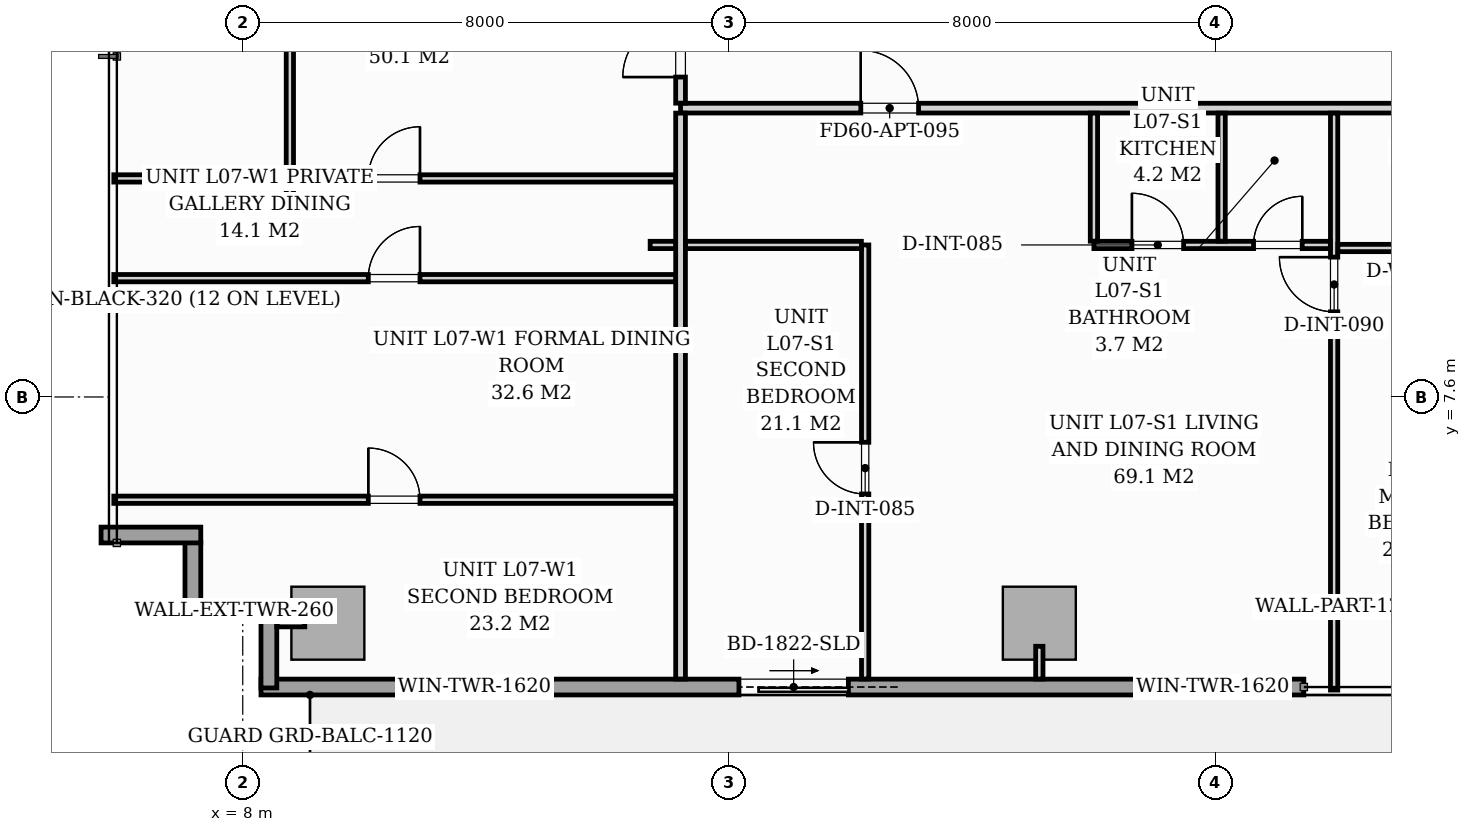
"""IFC4 building model, lengths in metres.
Left out: names, types, materials, properties, quantities, classifications, styles, units other than length and angle.
Written with IfcOpenShell. Run it as: python <this file> out.ifc"""

import sys

from ifc_helpers import new_model, si_unit, direction, frame, frame_2d, origin, origin_2d, place, context, subcontext, project, spatial, rectangle, extrude, source, transform, mapped, element, fill, save


model = new_model("IFC4")
c1 = context("Model", 3, precision=1e-05, world=origin(), true_north=direction((0.0, 1.0)))
c2 = subcontext(c1, "Body", "Model", "MODEL_VIEW")
j1 = project(units=[si_unit("LENGTHUNIT", "METRE"), si_unit("PLANEANGLEUNIT", "RADIAN")], contexts=[c1])
p1 = place(None, origin())
s1 = spatial("IfcSite", under=j1, at=p1, CompositionType="ELEMENT")
p2 = place(p1, origin())
s2 = spatial("IfcBuilding", under=s1, at=p2, CompositionType="ELEMENT")
p3 = place(p2, frame((0.0, 0.0, 29.4)))
s3 = spatial("IfcBuildingStorey", under=s2, at=p3, CompositionType="ELEMENT", Elevation=29.4)
m1 = source(origin(), c2, "Body", "SweptSolid", [
    extrude(rectangle(XDim=1.2, YDim=1.2, at=origin_2d()), origin(), (0.0, 0.0, 1.0), 3.196),
])
for number, where, z_axis, x_axis in (
    (1, (9.4, 3.88, 0.002), (0.0, 0.0, 1.0), (1.0, 0.0, 0.0)),
    (2, (21.1, 3.88, 0.002), (0.0, 0.0, 1.0), (1.0, 0.0, 0.0)),
):
    element("IfcColumn", number, at=place(p3, frame(where, z_axis=z_axis, x_axis=x_axis)), inside=s3, PredefinedType="COLUMN", context=c2, shape_type="MappedRepresentation", body=[
        mapped(m1, transform((0.0, 0.0, 0.0), scale=1.0)),
    ])
p4 = place(p3, frame((8.798, 4.08, 0.0), z_axis=(0.0, 0.0, 1.0), x_axis=(-1.0, 0.0, 0.0)))
e3 = element("IfcWall", 3, at=p4, inside=s3, PredefinedType="STANDARD", context=c2, shape_type="SweptSolid", body=[
    extrude(rectangle(XDim=1.878, YDim=0.26, at=frame_2d((0.939, 0.0))), origin(), (0.0, 0.0, 1.0), 2.94),
])
p5 = place(p3, frame((7.18, 4.065, 0.0), z_axis=(0.0, 0.0, 1.0), x_axis=(0.0, 1.0, 0.0)))
e4 = element("IfcWall", 4, at=p5, inside=s3, PredefinedType="STANDARD", context=c2, shape_type="SweptSolid", body=[
    extrude(rectangle(XDim=1.15, YDim=0.26, at=frame_2d((0.575, 0.0))), origin(), (0.0, 0.0, 1.0), 2.94),
])
p6 = place(p3, frame((7.31, 5.33, 0.0), z_axis=(0.0, 0.0, 1.0), x_axis=(-1.0, 0.0, 0.0)))
e5 = element("IfcWall", 5, at=p6, inside=s3, PredefinedType="STANDARD", context=c2, shape_type="SweptSolid", body=[
    extrude(rectangle(XDim=1.64, YDim=0.26, at=frame_2d((0.82, 0.0))), origin(), (0.0, 0.0, 1.0), 2.94),
])
p7 = place(p3, frame((25.45, 2.83, 0.0), z_axis=(0.0, 0.0, 1.0), x_axis=(-1.0, 0.0, 0.0)))
e6 = element("IfcWall", 6, at=p7, inside=s3, PredefinedType="STANDARD", context=c2, shape_type="SweptSolid", body=[
    extrude(rectangle(XDim=17.15, YDim=0.26, at=frame_2d((8.575, 0.0))), origin(), (0.0, 0.0, 1.0), 2.94),
])
p8 = place(p7, frame((7.49, 0.0, 0.0)))
e7 = element("IfcOpeningElement", 7, at=p8, cuts=e6, PredefinedType="OPENING", context=c2, shape_type="SweptSolid", body=[
    extrude(rectangle(XDim=1.8, YDim=2.06, at=frame_2d((0.9, 1.03))), frame((0.0, 0.14, 0.0), z_axis=(0.0, -1.0, 0.0), x_axis=(1.0, 0.0, 0.0)), (0.0, 0.0, 1.0), 0.28),
])
p9 = place(p7, frame((0.7, 0.0, 0.65)))
e8 = element("IfcOpeningElement", 8, at=p9, cuts=e6, PredefinedType="OPENING", context=c2, shape_type="SweptSolid", body=[
    extrude(rectangle(XDim=1.6, YDim=1.5, at=frame_2d((0.8, 0.75))), frame((0.0, 0.14, 0.0), z_axis=(0.0, -1.0, 0.0), x_axis=(1.0, 0.0, 0.0)), (0.0, 0.0, 1.0), 0.28),
])
p10 = place(p7, frame((12.84, 0.0, 0.75)))
e9 = element("IfcOpeningElement", 9, at=p10, cuts=e6, PredefinedType="OPENING", context=c2, shape_type="SweptSolid", body=[
    extrude(rectangle(XDim=1.6, YDim=1.5, at=frame_2d((0.8, 0.75))), frame((0.0, 0.14, 0.0), z_axis=(0.0, -1.0, 0.0), x_axis=(1.0, 0.0, 0.0)), (0.0, 0.0, 1.0), 0.28),
])
p11 = place(p3, frame((8.43, 2.815, 0.0), z_axis=(0.0, 0.0, 1.0), x_axis=(0.0, 1.0, 0.0)))
e10 = element("IfcWall", 10, at=p11, inside=s3, PredefinedType="STANDARD", context=c2, shape_type="SweptSolid", body=[
    extrude(rectangle(XDim=1.395, YDim=0.26, at=frame_2d((0.698, 0.0))), origin(), (0.0, 0.0, 1.0), 2.94),
])
p12 = place(p3, frame((15.2, 12.35, 0.0), z_axis=(0.0, 0.0, 1.0), x_axis=(1.0, 0.0, 0.0)))
e11 = element("IfcWall", 11, at=p12, inside=s3, PredefinedType="PARTITIONING", context=c2, shape_type="SweptSolid", body=[
    extrude(rectangle(XDim=37.1, YDim=0.16, at=frame_2d((18.55, 0.0))), origin(), (0.0, 0.0, 1.0), 2.94),
])
p13 = place(p12, frame((2.964, 0.0, 0.0)))
e12 = element("IfcOpeningElement", 12, at=p13, cuts=e11, PredefinedType="OPENING", context=c2, shape_type="SweptSolid", body=[
    extrude(rectangle(XDim=0.95, YDim=2.06, at=frame_2d((0.475, 1.03))), frame((0.0, 0.09, 0.0), z_axis=(0.0, -1.0, 0.0), x_axis=(1.0, 0.0, 0.0)), (0.0, 0.0, 1.0), 0.18),
])
p14 = place(p12, frame((28.202, 0.0, 0.0)))
e13 = element("IfcOpeningElement", 13, at=p14, cuts=e11, PredefinedType="OPENING", context=c2, shape_type="SweptSolid", body=[
    extrude(rectangle(XDim=0.95, YDim=2.06, at=frame_2d((0.475, 1.03))), frame((0.0, 0.09, 0.0), z_axis=(0.0, -1.0, 0.0), x_axis=(1.0, 0.0, 0.0)), (0.0, 0.0, 1.0), 0.18),
])
p15 = place(p3, frame((15.2, 2.962, 0.0), z_axis=(0.0, 0.0, 1.0), x_axis=(0.0, 1.0, 0.0)))
e14 = element("IfcWall", 14, at=p15, inside=s3, PredefinedType="PARTITIONING", context=c2, shape_type="SweptSolid", body=[
    extrude(rectangle(XDim=9.306, YDim=0.16, at=frame_2d((4.653, 0.0))), origin(), (0.0, 0.0, 1.0), 2.94),
])
p16 = place(p3, frame((15.2, 12.432, 0.0), z_axis=(0.0, 0.0, 1.0), x_axis=(0.0, 1.0, 0.0)))
e15 = element("IfcWall", 15, at=p16, inside=s3, PredefinedType="PARTITIONING", context=c2, shape_type="SweptSolid", body=[
    extrude(rectangle(XDim=15.006, YDim=0.16, at=frame_2d((7.503, 0.0))), origin(), (0.0, 0.0, 1.0), 2.94),
])
p17 = place(p16, frame((0.429, 0.0, 0.0)))
e16 = element("IfcOpeningElement", 16, at=p17, cuts=e15, PredefinedType="OPENING", context=c2, shape_type="SweptSolid", body=[
    extrude(rectangle(XDim=0.95, YDim=2.06, at=frame_2d((0.475, 1.03))), frame((0.0, 0.09, 0.0), z_axis=(0.0, -1.0, 0.0), x_axis=(1.0, 0.0, 0.0)), (0.0, 0.0, 1.0), 0.18),
])
p18 = place(p3, frame((25.948, 2.78, 0.0), z_axis=(0.0, 0.0, 1.0), x_axis=(0.0, 1.0, 0.0)))
e17 = element("IfcWall", 17, at=p18, inside=s3, PredefinedType="PARTITIONING", context=c2, shape_type="SweptSolid", body=[
    extrude(rectangle(XDim=9.488, YDim=0.12, at=frame_2d((4.744, 0.0))), origin(), (0.0, 0.0, 1.0), 2.94),
])
p19 = place(p18, frame((6.22, 0.0, 0.0)))
e18 = element("IfcOpeningElement", 18, at=p19, cuts=e17, PredefinedType="OPENING", context=c2, shape_type="SweptSolid", body=[
    extrude(rectangle(XDim=0.9, YDim=2.05, at=frame_2d((0.45, 1.025))), frame((0.0, 0.07, 0.0), z_axis=(0.0, -1.0, 0.0), x_axis=(1.0, 0.0, 0.0)), (0.0, 0.0, 1.0), 0.14),
])
p20 = place(p3, frame((21.998, 10.1, 0.0), z_axis=(0.0, 0.0, 1.0), x_axis=(1.0, 0.0, 0.0)))
e19 = element("IfcWall", 19, at=p20, inside=s3, PredefinedType="PARTITIONING", context=c2, shape_type="SweptSolid", body=[
    extrude(rectangle(XDim=3.888, YDim=0.12, at=frame_2d((1.944, 0.0))), origin(), (0.0, 0.0, 1.0), 2.94),
])
p21 = place(p20, frame((0.625, 0.0, 0.0)))
e20 = element("IfcOpeningElement", 20, at=p21, cuts=e19, PredefinedType="OPENING", context=c2, shape_type="SweptSolid", body=[
    extrude(rectangle(XDim=0.85, YDim=2.05, at=frame_2d((0.425, 1.025))), frame((0.0, 0.07, 0.0), z_axis=(0.0, -1.0, 0.0), x_axis=(1.0, 0.0, 0.0)), (0.0, 0.0, 1.0), 0.14),
])
p22 = place(p20, frame((2.625, 0.0, 0.0)))
e21 = element("IfcOpeningElement", 21, at=p22, cuts=e19, PredefinedType="OPENING", context=c2, shape_type="SweptSolid", body=[
    extrude(rectangle(XDim=0.8, YDim=2.02, at=frame_2d((0.4, 1.01))), frame((0.0, 0.07, 0.0), z_axis=(0.0, -1.0, 0.0), x_axis=(1.0, 0.0, 0.0)), (0.0, 0.0, 1.0), 0.14),
])
for number, where, z_axis, x_axis in (
    (22, (24.098, 10.162, 0.0), (0.0, 0.0, 1.0), (0.0, 1.0, 0.0)),
    (23, (21.998, 10.162, 0.0), (0.0, 0.0, 1.0), (0.0, 1.0, 0.0)),
):
    element("IfcWall", number, at=place(p3, frame(where, z_axis=z_axis, x_axis=x_axis)), inside=s3, PredefinedType="PARTITIONING", context=c2, shape_type="SweptSolid", body=[
        extrude(rectangle(XDim=2.106, YDim=0.12, at=frame_2d((1.053, 0.0))), origin(), (0.0, 0.0, 1.0), 2.94),
    ])
p23 = place(p3, frame((26.01, 10.05, 0.0), z_axis=(0.0, 0.0, 1.0), x_axis=(1.0, 0.0, 0.0)))
e24 = element("IfcWall", 24, at=p23, inside=s3, PredefinedType="PARTITIONING", context=c2, shape_type="SweptSolid", body=[
    extrude(rectangle(XDim=2.888, YDim=0.12, at=frame_2d((1.444, 0.0))), origin(), (0.0, 0.0, 1.0), 2.94),
])
p24 = place(p23, frame((0.963, 0.0, 0.0)))
e25 = element("IfcOpeningElement", 25, at=p24, cuts=e24, PredefinedType="OPENING", context=c2, shape_type="SweptSolid", body=[
    extrude(rectangle(XDim=0.8, YDim=2.02, at=frame_2d((0.4, 1.01))), frame((0.0, 0.07, 0.0), z_axis=(0.0, -1.0, 0.0), x_axis=(1.0, 0.0, 0.0)), (0.0, 0.0, 1.0), 0.14),
])
p25 = place(p3, frame((18.236, 2.962, 0.0), z_axis=(0.0, 0.0, 1.0), x_axis=(0.0, 1.0, 0.0)))
e26 = element("IfcWall", 26, at=p25, inside=s3, PredefinedType="PARTITIONING", context=c2, shape_type="SweptSolid", body=[
    extrude(rectangle(XDim=7.138, YDim=0.12, at=frame_2d((3.569, 0.0))), origin(), (0.0, 0.0, 1.0), 2.94),
])
p26 = place(p25, frame((3.043, 0.0, 0.0)))
e27 = element("IfcOpeningElement", 27, at=p26, cuts=e26, PredefinedType="OPENING", context=c2, shape_type="SweptSolid", body=[
    extrude(rectangle(XDim=0.85, YDim=2.05, at=frame_2d((0.425, 1.025))), frame((0.0, 0.07, 0.0), z_axis=(0.0, -1.0, 0.0), x_axis=(1.0, 0.0, 0.0)), (0.0, 0.0, 1.0), 0.14),
])
p27 = place(p3, frame((14.7, 10.1, 0.0), z_axis=(0.0, 0.0, 1.0), x_axis=(1.0, 0.0, 0.0)))
e28 = element("IfcWall", 28, at=p27, inside=s3, PredefinedType="PARTITIONING", context=c2, shape_type="SweptSolid", body=[
    extrude(rectangle(XDim=0.418, YDim=0.12, at=frame_2d((0.209, 0.0))), origin(), (0.0, 0.0, 1.0), 2.94),
])
p28 = place(p3, frame((15.282, 10.1, 0.0), z_axis=(0.0, 0.0, 1.0), x_axis=(1.0, 0.0, 0.0)))
e29 = element("IfcWall", 29, at=p28, inside=s3, PredefinedType="PARTITIONING", context=c2, shape_type="SweptSolid", body=[
    extrude(rectangle(XDim=2.892, YDim=0.12, at=frame_2d((1.446, 0.0))), origin(), (0.0, 0.0, 1.0), 2.94),
])
p29 = place(p3, frame((5.88, 5.91, 0.0), z_axis=(0.0, 0.0, 1.0), x_axis=(1.0, 0.0, 0.0)))
e30 = element("IfcWall", 30, at=p29, inside=s3, PredefinedType="PARTITIONING", context=c2, shape_type="SweptSolid", body=[
    extrude(rectangle(XDim=9.238, YDim=0.12, at=frame_2d((4.619, 0.0))), origin(), (0.0, 0.0, 1.0), 2.94),
])
p30 = place(p29, frame((4.185, 0.0, 0.0)))
e31 = element("IfcOpeningElement", 31, at=p30, cuts=e30, PredefinedType="OPENING", context=c2, shape_type="SweptSolid", body=[
    extrude(rectangle(XDim=0.85, YDim=2.05, at=frame_2d((0.425, 1.025))), frame((0.0, 0.07, 0.0), z_axis=(0.0, -1.0, 0.0), x_axis=(1.0, 0.0, 0.0)), (0.0, 0.0, 1.0), 0.14),
])
p31 = place(p3, frame((5.88, 9.554, 0.0), z_axis=(0.0, 0.0, 1.0), x_axis=(1.0, 0.0, 0.0)))
e32 = element("IfcWall", 32, at=p31, inside=s3, PredefinedType="PARTITIONING", context=c2, shape_type="SweptSolid", body=[
    extrude(rectangle(XDim=9.238, YDim=0.12, at=frame_2d((4.619, 0.0))), origin(), (0.0, 0.0, 1.0), 2.94),
])
p32 = place(p31, frame((4.185, 0.0, 0.0)))
e33 = element("IfcOpeningElement", 33, at=p32, cuts=e32, PredefinedType="OPENING", context=c2, shape_type="SweptSolid", body=[
    extrude(rectangle(XDim=0.85, YDim=2.05, at=frame_2d((0.425, 1.025))), frame((0.0, 0.07, 0.0), z_axis=(0.0, -1.0, 0.0), x_axis=(1.0, 0.0, 0.0)), (0.0, 0.0, 1.0), 0.14),
])
p33 = place(p3, frame((5.88, 11.194, 0.0), z_axis=(0.0, 0.0, 1.0), x_axis=(1.0, 0.0, 0.0)))
e34 = element("IfcWall", 34, at=p33, inside=s3, PredefinedType="PARTITIONING", context=c2, shape_type="SweptSolid", body=[
    extrude(rectangle(XDim=9.238, YDim=0.12, at=frame_2d((4.619, 0.0))), origin(), (0.0, 0.0, 1.0), 2.94),
])
p34 = place(p33, frame((4.185, 0.0, 0.0)))
e35 = element("IfcOpeningElement", 35, at=p34, cuts=e34, PredefinedType="OPENING", context=c2, shape_type="SweptSolid", body=[
    extrude(rectangle(XDim=0.85, YDim=2.05, at=frame_2d((0.425, 1.025))), frame((0.0, 0.07, 0.0), z_axis=(0.0, -1.0, 0.0), x_axis=(1.0, 0.0, 0.0)), (0.0, 0.0, 1.0), 0.14),
])
p35 = place(p3, frame((8.775, 10.754, 0.0), z_axis=(0.0, 0.0, 1.0), x_axis=(0.0, 1.0, 0.0)))
e36 = element("IfcWall", 36, at=p35, inside=s3, PredefinedType="PARTITIONING", context=c2, shape_type="SweptSolid", body=[
    extrude(rectangle(XDim=0.378, YDim=0.12, at=frame_2d((0.189, 0.0))), origin(), (0.0, 0.0, 1.0), 2.94),
])
p36 = place(p3, frame((8.775, 11.256, 0.0), z_axis=(0.0, 0.0, 1.0), x_axis=(0.0, 1.0, 0.0)))
e37 = element("IfcWall", 37, at=p36, inside=s3, PredefinedType="PARTITIONING", context=c2, shape_type="SweptSolid", body=[
    extrude(rectangle(XDim=9.663, YDim=0.12, at=frame_2d((4.832, 0.0))), origin(), (0.0, 0.0, 1.0), 2.94),
])
p37 = place(p36, frame((4.766, 0.0, 0.0)))
e38 = element("IfcOpeningElement", 38, at=p37, cuts=e37, PredefinedType="OPENING", context=c2, shape_type="SweptSolid", body=[
    extrude(rectangle(XDim=0.85, YDim=2.05, at=frame_2d((0.425, 1.025))), frame((0.0, 0.07, 0.0), z_axis=(0.0, -1.0, 0.0), x_axis=(1.0, 0.0, 0.0)), (0.0, 0.0, 1.0), 0.14),
])
p38 = place(p3, frame((9.02, 3.88, 0.0), z_axis=(0.0, 0.0, 1.0), x_axis=(-1.0, 0.0, 0.0)))
e39 = element("IfcWall", 39, at=p38, inside=s3, PredefinedType="PARTITIONING", context=c2, shape_type="SweptSolid", body=[
    extrude(rectangle(XDim=0.458, YDim=0.12, at=frame_2d((0.229, 0.0))), origin(), (0.0, 0.0, 1.0), 2.94),
])
p39 = place(p3, frame((21.1, 3.5, 0.0), z_axis=(0.0, 0.0, 1.0), x_axis=(0.0, -1.0, 0.0)))
e40 = element("IfcWall", 40, at=p39, inside=s3, PredefinedType="PARTITIONING", context=c2, shape_type="SweptSolid", body=[
    extrude(rectangle(XDim=0.538, YDim=0.12, at=frame_2d((0.269, 0.0))), origin(), (0.0, 0.0, 1.0), 2.94),
])
m2 = source(origin(), c2, "Body", "SweptSolid", [
    extrude(rectangle(XDim=1.8, YDim=2.06, at=frame_2d((0.9, 1.03))), frame((0.0, 0.025, 0.0), z_axis=(0.0, -1.0, 0.0), x_axis=(1.0, 0.0, 0.0)), (0.0, 0.0, 1.0), 0.05),
])
p40 = place(p8, origin())
e41 = element("IfcDoor", 41, at=p40, inside=s3, OperationType="SLIDING_TO_LEFT", PredefinedType="DOOR", context=c2, shape_type="MappedRepresentation", body=[
    mapped(m2, transform((0.0, 0.0, 0.0), scale=1.0)),
])
fill(e7, e41)
m3 = source(origin(), c2, "Body", "SweptSolid", [
    extrude(rectangle(XDim=1.6, YDim=1.5, at=frame_2d((0.8, 0.75))), frame((0.0, 0.03, 0.0), z_axis=(0.0, -1.0, 0.0), x_axis=(1.0, 0.0, 0.0)), (0.0, 0.0, 1.0), 0.06),
])
p41 = place(p9, origin())
e42 = element("IfcWindow", 42, at=p41, inside=s3, PartitioningType="SINGLE_PANEL", PredefinedType="WINDOW", context=c2, shape_type="MappedRepresentation", body=[
    mapped(m3, transform((0.0, 0.0, 0.0), scale=1.0)),
])
fill(e8, e42)
p42 = place(p10, origin())
e43 = element("IfcWindow", 43, at=p42, inside=s3, PartitioningType="SINGLE_PANEL", PredefinedType="WINDOW", context=c2, shape_type="MappedRepresentation", body=[
    mapped(m3, transform((0.0, 0.0, 0.0), scale=1.0)),
])
fill(e9, e43)
m4 = source(origin(), c2, "Body", "SweptSolid", [
    extrude(rectangle(XDim=0.85, YDim=2.05, at=frame_2d((0.425, 1.025))), frame((0.0, 0.025, 0.0), z_axis=(0.0, -1.0, 0.0), x_axis=(1.0, 0.0, 0.0)), (0.0, 0.0, 1.0), 0.05),
])
p43 = place(p26, origin())
e44 = element("IfcDoor", 44, at=p43, inside=s3, OperationType="SINGLE_SWING_RIGHT", PredefinedType="DOOR", context=c2, shape_type="MappedRepresentation", body=[
    mapped(m4, transform((0.0, 0.0, 0.0), scale=1.0)),
])
fill(e27, e44)
m5 = source(origin(), c2, "Body", "SweptSolid", [
    extrude(rectangle(XDim=0.95, YDim=2.06, at=frame_2d((0.475, 1.03))), frame((0.0, 0.025, 0.0), z_axis=(0.0, -1.0, 0.0), x_axis=(1.0, 0.0, 0.0)), (0.0, 0.0, 1.0), 0.05),
])
p44 = place(p13, origin())
e45 = element("IfcDoor", 45, at=p44, inside=s3, OperationType="SINGLE_SWING_LEFT", PredefinedType="DOOR", context=c2, shape_type="MappedRepresentation", body=[
    mapped(m5, transform((0.0, 0.0, 0.0), scale=1.0)),
])
fill(e12, e45)
m6 = source(origin(), c2, "Body", "SweptSolid", [
    extrude(rectangle(XDim=0.9, YDim=2.05, at=frame_2d((0.45, 1.025))), frame((0.0, 0.025, 0.0), z_axis=(0.0, -1.0, 0.0), x_axis=(1.0, 0.0, 0.0)), (0.0, 0.0, 1.0), 0.05),
])
p45 = place(p19, origin())
e46 = element("IfcDoor", 46, at=p45, inside=s3, OperationType="SINGLE_SWING_RIGHT", PredefinedType="DOOR", context=c2, shape_type="MappedRepresentation", body=[
    mapped(m6, transform((0.0, 0.0, 0.0), scale=1.0)),
])
fill(e18, e46)
p46 = place(p21, origin())
e47 = element("IfcDoor", 47, at=p46, inside=s3, OperationType="SINGLE_SWING_LEFT", PredefinedType="DOOR", context=c2, shape_type="MappedRepresentation", body=[
    mapped(m4, transform((0.0, 0.0, 0.0), scale=1.0)),
])
fill(e20, e47)
m7 = source(origin(), c2, "Body", "SweptSolid", [
    extrude(rectangle(XDim=0.8, YDim=2.02, at=frame_2d((0.4, 1.01))), frame((0.0, 0.025, 0.0), z_axis=(0.0, -1.0, 0.0), x_axis=(1.0, 0.0, 0.0)), (0.0, 0.0, 1.0), 0.05),
])
p47 = place(p22, origin())
e48 = element("IfcDoor", 48, at=p47, inside=s3, OperationType="SINGLE_SWING_RIGHT", PredefinedType="DOOR", context=c2, shape_type="MappedRepresentation", body=[
    mapped(m7, transform((0.0, 0.0, 0.0), scale=1.0)),
])
fill(e21, e48)
p48 = place(p17, origin())
e49 = element("IfcDoor", 49, at=p48, inside=s3, OperationType="SINGLE_SWING_LEFT", PredefinedType="DOOR", context=c2, shape_type="MappedRepresentation", body=[
    mapped(m5, transform((0.0, 0.0, 0.0), scale=1.0)),
])
fill(e16, e49)
p49 = place(p30, origin())
e50 = element("IfcDoor", 50, at=p49, inside=s3, OperationType="SINGLE_SWING_LEFT", PredefinedType="DOOR", context=c2, shape_type="MappedRepresentation", body=[
    mapped(m4, transform((0.0, 0.0, 0.0), scale=1.0)),
])
fill(e31, e50)
p50 = place(p32, origin())
e51 = element("IfcDoor", 51, at=p50, inside=s3, OperationType="SINGLE_SWING_RIGHT", PredefinedType="DOOR", context=c2, shape_type="MappedRepresentation", body=[
    mapped(m4, transform((0.0, 0.0, 0.0), scale=1.0)),
])
fill(e33, e51)
p51 = place(p34, origin())
e52 = element("IfcDoor", 52, at=p51, inside=s3, OperationType="SINGLE_SWING_RIGHT", PredefinedType="DOOR", context=c2, shape_type="MappedRepresentation", body=[
    mapped(m4, transform((0.0, 0.0, 0.0), scale=1.0)),
])
fill(e35, e52)
save(model, sys.argv[1])
